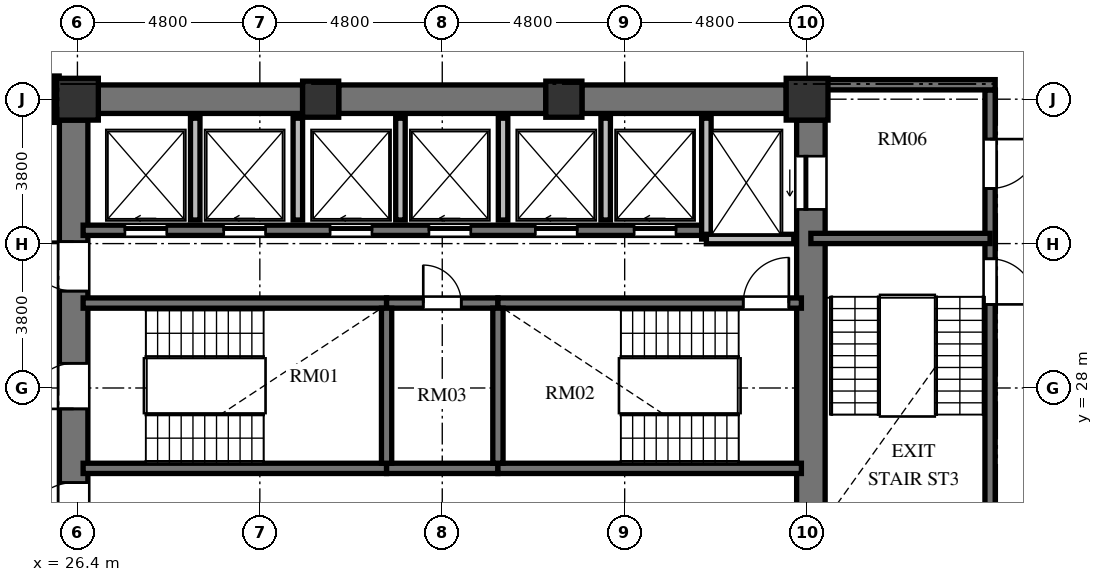
"""IFC4 building model, lengths in metres.
Left out: names, types, materials, properties, quantities, classifications, styles, units other than length and angle.
Written with IfcOpenShell. Run it as: python <this file> out.ifc"""

import sys

from ifc_helpers import new_model, si_unit, direction, frame, frame_2d, origin, origin_2d, place, context, subcontext, project, spatial, rectangle, extrude, element, fill, save


model = new_model("IFC4")
c1 = context("Model", 3, precision=1e-05, world=origin(), true_north=direction((0.0, 1.0)))
c2 = subcontext(c1, "Body", "Model", "MODEL_VIEW")
j1 = project(units=[si_unit("LENGTHUNIT", "METRE"), si_unit("PLANEANGLEUNIT", "RADIAN")], contexts=[c1])
p1 = place(None, origin())
s1 = spatial("IfcSite", under=j1, at=p1, CompositionType="ELEMENT")
p2 = place(p1, origin())
s2 = spatial("IfcBuilding", under=s1, at=p2, CompositionType="ELEMENT")
p3 = place(p2, frame((0.0, 0.0, 121.872)))
s3 = spatial("IfcBuildingStorey", under=s2, at=p3, CompositionType="ELEMENT", Elevation=121.872)
p4 = place(p3, frame((45.6, 35.6, 0.0), z_axis=(0.0, 0.0, 1.0), x_axis=(1.0, 0.0, 0.0)))
e1 = element("IfcColumn", 1, at=p4, inside=s3, PredefinedType="COLUMN", context=c2, shape_type="SweptSolid", body=[
    extrude(rectangle(XDim=1.1, YDim=1.1, at=origin_2d()), origin(), (0.0, 0.0, 1.0), 3.648),
])
for number, where, z_axis, x_axis in (
    (2, (39.2, 35.6, 0.0), (0.0, 0.0, 1.0), (1.0, 0.0, 0.0)),
    (3, (32.8, 35.6, 0.0), (0.0, 0.0, 1.0), (1.0, 0.0, 0.0)),
):
    element("IfcColumn", number, at=place(p3, frame(where, z_axis=z_axis, x_axis=x_axis)), inside=s3, PredefinedType="COLUMN", context=c2, shape_type="SweptSolid", body=[
        extrude(rectangle(XDim=0.95, YDim=0.95, at=origin_2d()), origin(), (0.0, 0.0, 1.0), 3.648),
    ])
p5 = place(p3, frame((26.4, 35.6, 0.0), z_axis=(0.0, 0.0, 1.0), x_axis=(1.0, 0.0, 0.0)))
e4 = element("IfcColumn", 4, at=p5, inside=s3, PredefinedType="COLUMN", context=c2, shape_type="SweptSolid", body=[
    extrude(rectangle(XDim=1.1, YDim=1.1, at=origin_2d()), origin(), (0.0, 0.0, 1.0), 3.648),
])
p6 = place(p3, frame((26.3, 20.95, 0.0), z_axis=(0.0, 0.0, 1.0), x_axis=(0.0, 1.0, 0.0)))
e5 = element("IfcWall", 5, at=p6, inside=s3, PredefinedType="SHEAR", context=c2, shape_type="SweptSolid", body=[
    extrude(rectangle(XDim=14.1, YDim=0.75, at=frame_2d((7.05, 0.0))), origin(), (0.0, 0.0, 1.0), 3.648),
])
p7 = place(p6, frame((6.5, 0.0, 0.0)))
e6 = element("IfcOpeningElement", 6, at=p7, cuts=e5, PredefinedType="OPENING", context=c2, shape_type="SweptSolid", body=[
    extrude(rectangle(XDim=1.2, YDim=2.15, at=frame_2d((0.6, 1.075))), frame((0.0, 0.385, 0.0), z_axis=(0.0, -1.0, 0.0), x_axis=(1.0, 0.0, 0.0)), (0.0, 0.0, 1.0), 0.77),
])
p8 = place(p6, frame((9.6, 0.0, 0.0)))
e7 = element("IfcOpeningElement", 7, at=p8, cuts=e5, PredefinedType="OPENING", context=c2, shape_type="SweptSolid", body=[
    extrude(rectangle(XDim=1.3, YDim=2.2, at=frame_2d((0.65, 1.1))), frame((0.0, 0.385, 0.0), z_axis=(0.0, -1.0, 0.0), x_axis=(1.0, 0.0, 0.0)), (0.0, 0.0, 1.0), 0.77),
])
p9 = place(p6, frame((3.26, 0.0, 0.0)))
e8 = element("IfcOpeningElement", 8, at=p9, cuts=e5, PredefinedType="OPENING", context=c2, shape_type="SweptSolid", body=[
    extrude(rectangle(XDim=1.3, YDim=2.2, at=frame_2d((0.65, 1.1))), frame((0.0, 0.385, 0.0), z_axis=(0.0, -1.0, 0.0), x_axis=(1.0, 0.0, 0.0)), (0.0, 0.0, 1.0), 0.77),
])
p10 = place(p3, frame((45.7, 20.95, 0.0), z_axis=(0.0, 0.0, 1.0), x_axis=(0.0, 1.0, 0.0)))
e9 = element("IfcWall", 9, at=p10, inside=s3, PredefinedType="SHEAR", context=c2, shape_type="SweptSolid", body=[
    extrude(rectangle(XDim=14.1, YDim=0.75, at=frame_2d((7.05, 0.0))), origin(), (0.0, 0.0, 1.0), 3.648),
])
p11 = place(p10, frame((11.75, 0.0, 0.0)))
e10 = element("IfcOpeningElement", 10, at=p11, cuts=e9, PredefinedType="OPENING", context=c2, shape_type="SweptSolid", body=[
    extrude(rectangle(XDim=1.4, YDim=2.3, at=frame_2d((0.7, 1.15))), frame((0.0, 0.385, 0.0), z_axis=(0.0, -1.0, 0.0), x_axis=(1.0, 0.0, 0.0)), (0.0, 0.0, 1.0), 0.77),
])
p12 = place(p10, frame((0.95, 0.0, 0.0)))
e11 = element("IfcOpeningElement", 11, at=p12, cuts=e9, PredefinedType="OPENING", context=c2, shape_type="SweptSolid", body=[
    extrude(rectangle(XDim=1.4, YDim=2.3, at=frame_2d((0.7, 1.15))), frame((0.0, 0.385, 0.0), z_axis=(0.0, -1.0, 0.0), x_axis=(1.0, 0.0, 0.0)), (0.0, 0.0, 1.0), 0.77),
])
p13 = place(p3, frame((26.95, 35.6, 0.0), z_axis=(0.0, 0.0, 1.0), x_axis=(1.0, 0.0, 0.0)))
e12 = element("IfcWall", 12, at=p13, inside=s3, PredefinedType="SHEAR", context=c2, shape_type="SweptSolid", body=[
    extrude(rectangle(XDim=5.375, YDim=0.75, at=frame_2d((2.688, 0.0))), origin(), (0.0, 0.0, 1.0), 3.648),
])
p14 = place(p3, frame((33.275, 35.6, 0.0), z_axis=(0.0, 0.0, 1.0), x_axis=(1.0, 0.0, 0.0)))
e13 = element("IfcWall", 13, at=p14, inside=s3, PredefinedType="SHEAR", context=c2, shape_type="SweptSolid", body=[
    extrude(rectangle(XDim=5.45, YDim=0.75, at=frame_2d((2.725, 0.0))), origin(), (0.0, 0.0, 1.0), 3.648),
])
p15 = place(p3, frame((39.675, 35.6, 0.0), z_axis=(0.0, 0.0, 1.0), x_axis=(1.0, 0.0, 0.0)))
e14 = element("IfcWall", 14, at=p15, inside=s3, PredefinedType="SHEAR", context=c2, shape_type="SweptSolid", body=[
    extrude(rectangle(XDim=5.375, YDim=0.75, at=frame_2d((2.688, 0.0))), origin(), (0.0, 0.0, 1.0), 3.648),
])
p16 = place(p3, frame((26.55, 30.235, 0.0), z_axis=(0.0, 0.0, 1.0), x_axis=(1.0, 0.0, 0.0)))
e15 = element("IfcWall", 15, at=p16, inside=s3, PredefinedType="SHEAR", context=c2, shape_type="SweptSolid", body=[
    extrude(rectangle(XDim=7.985, YDim=0.27, at=frame_2d((3.992, 0.0))), origin(), (0.0, 0.0, 1.0), 3.648),
])
p17 = place(p3, frame((34.535, 30.235, 0.0), z_axis=(0.0, 0.0, 1.0), x_axis=(1.0, 0.0, 0.0)))
e16 = element("IfcWall", 16, at=p17, inside=s3, PredefinedType="SHEAR", context=c2, shape_type="SweptSolid", body=[
    extrude(rectangle(XDim=2.93, YDim=0.27, at=frame_2d((1.465, 0.0))), origin(), (0.0, 0.0, 1.0), 3.648),
])
p18 = place(p17, frame((0.965, 0.0, 0.0)))
e17 = element("IfcOpeningElement", 17, at=p18, cuts=e16, PredefinedType="OPENING", context=c2, shape_type="SweptSolid", body=[
    extrude(rectangle(XDim=1.0, YDim=2.1, at=frame_2d((0.5, 1.05))), frame((0.0, 0.145, 0.0), z_axis=(0.0, -1.0, 0.0), x_axis=(1.0, 0.0, 0.0)), (0.0, 0.0, 1.0), 0.29),
])
p19 = place(p3, frame((37.465, 30.235, 0.0), z_axis=(0.0, 0.0, 1.0), x_axis=(1.0, 0.0, 0.0)))
e18 = element("IfcWall", 18, at=p19, inside=s3, PredefinedType="SHEAR", context=c2, shape_type="SweptSolid", body=[
    extrude(rectangle(XDim=7.985, YDim=0.27, at=frame_2d((3.992, 0.0))), origin(), (0.0, 0.0, 1.0), 3.648),
])
p20 = place(p19, frame((6.455, 0.0, 0.0)))
e19 = element("IfcOpeningElement", 19, at=p20, cuts=e18, PredefinedType="OPENING", context=c2, shape_type="SweptSolid", body=[
    extrude(rectangle(XDim=1.2, YDim=2.15, at=frame_2d((0.6, 1.075))), frame((0.0, 0.145, 0.0), z_axis=(0.0, -1.0, 0.0), x_axis=(1.0, 0.0, 0.0)), (0.0, 0.0, 1.0), 0.29),
])
p21 = place(p3, frame((26.55, 25.885, 0.0), z_axis=(0.0, 0.0, 1.0), x_axis=(1.0, 0.0, 0.0)))
e20 = element("IfcWall", 20, at=p21, inside=s3, PredefinedType="SHEAR", context=c2, shape_type="SweptSolid", body=[
    extrude(rectangle(XDim=7.985, YDim=0.27, at=frame_2d((3.992, 0.0))), origin(), (0.0, 0.0, 1.0), 3.648),
])
p22 = place(p3, frame((34.535, 25.885, 0.0), z_axis=(0.0, 0.0, 1.0), x_axis=(1.0, 0.0, 0.0)))
e21 = element("IfcWall", 21, at=p22, inside=s3, PredefinedType="SHEAR", context=c2, shape_type="SweptSolid", body=[
    extrude(rectangle(XDim=2.93, YDim=0.27, at=frame_2d((1.465, 0.0))), origin(), (0.0, 0.0, 1.0), 3.648),
])
p23 = place(p3, frame((37.465, 25.885, 0.0), z_axis=(0.0, 0.0, 1.0), x_axis=(1.0, 0.0, 0.0)))
e22 = element("IfcWall", 22, at=p23, inside=s3, PredefinedType="SHEAR", context=c2, shape_type="SweptSolid", body=[
    extrude(rectangle(XDim=7.985, YDim=0.27, at=frame_2d((3.992, 0.0))), origin(), (0.0, 0.0, 1.0), 3.648),
])
for number, where, z_axis, x_axis in (
    (23, (34.535, 26.02, 0.0), (0.0, 0.0, 1.0), (0.0, 1.0, 0.0)),
    (24, (37.465, 26.02, 0.0), (0.0, 0.0, 1.0), (0.0, 1.0, 0.0)),
):
    element("IfcWall", number, at=place(p3, frame(where, z_axis=z_axis, x_axis=x_axis)), inside=s3, PredefinedType="SHEAR", context=c2, shape_type="SweptSolid", body=[
        extrude(rectangle(XDim=4.08, YDim=0.27, at=frame_2d((2.04, 0.0))), origin(), (0.0, 0.0, 1.0), 3.648),
    ])
p24 = place(p3, frame((26.55, 32.15, 0.0), z_axis=(0.0, 0.0, 1.0), x_axis=(1.0, 0.0, 0.0)))
e25 = element("IfcWall", 25, at=p24, inside=s3, PredefinedType="SHEAR", context=c2, shape_type="SweptSolid", body=[
    extrude(rectangle(XDim=16.4, YDim=0.27, at=frame_2d((8.2, 0.0))), origin(), (0.0, 0.0, 1.0), 3.648),
])
p25 = place(p24, frame((1.1, 0.0, 0.0)))
e26 = element("IfcOpeningElement", 26, at=p25, cuts=e25, PredefinedType="OPENING", context=c2, shape_type="SweptSolid", body=[
    extrude(rectangle(XDim=1.1, YDim=2.2, at=frame_2d((0.55, 1.1))), frame((0.0, 0.145, 0.0), z_axis=(0.0, -1.0, 0.0), x_axis=(1.0, 0.0, 0.0)), (0.0, 0.0, 1.0), 0.29),
])
p26 = place(p24, frame((3.7, 0.0, 0.0)))
e27 = element("IfcOpeningElement", 27, at=p26, cuts=e25, PredefinedType="OPENING", context=c2, shape_type="SweptSolid", body=[
    extrude(rectangle(XDim=1.1, YDim=2.2, at=frame_2d((0.55, 1.1))), frame((0.0, 0.145, 0.0), z_axis=(0.0, -1.0, 0.0), x_axis=(1.0, 0.0, 0.0)), (0.0, 0.0, 1.0), 0.29),
])
p27 = place(p24, frame((6.5, 0.0, 0.0)))
e28 = element("IfcOpeningElement", 28, at=p27, cuts=e25, PredefinedType="OPENING", context=c2, shape_type="SweptSolid", body=[
    extrude(rectangle(XDim=1.1, YDim=2.2, at=frame_2d((0.55, 1.1))), frame((0.0, 0.145, 0.0), z_axis=(0.0, -1.0, 0.0), x_axis=(1.0, 0.0, 0.0)), (0.0, 0.0, 1.0), 0.29),
])
p28 = place(p24, frame((9.1, 0.0, 0.0)))
e29 = element("IfcOpeningElement", 29, at=p28, cuts=e25, PredefinedType="OPENING", context=c2, shape_type="SweptSolid", body=[
    extrude(rectangle(XDim=1.1, YDim=2.2, at=frame_2d((0.55, 1.1))), frame((0.0, 0.145, 0.0), z_axis=(0.0, -1.0, 0.0), x_axis=(1.0, 0.0, 0.0)), (0.0, 0.0, 1.0), 0.29),
])
p29 = place(p24, frame((11.9, 0.0, 0.0)))
e30 = element("IfcOpeningElement", 30, at=p29, cuts=e25, PredefinedType="OPENING", context=c2, shape_type="SweptSolid", body=[
    extrude(rectangle(XDim=1.1, YDim=2.2, at=frame_2d((0.55, 1.1))), frame((0.0, 0.145, 0.0), z_axis=(0.0, -1.0, 0.0), x_axis=(1.0, 0.0, 0.0)), (0.0, 0.0, 1.0), 0.29),
])
p30 = place(p24, frame((14.5, 0.0, 0.0)))
e31 = element("IfcOpeningElement", 31, at=p30, cuts=e25, PredefinedType="OPENING", context=c2, shape_type="SweptSolid", body=[
    extrude(rectangle(XDim=1.1, YDim=2.2, at=frame_2d((0.55, 1.1))), frame((0.0, 0.145, 0.0), z_axis=(0.0, -1.0, 0.0), x_axis=(1.0, 0.0, 0.0)), (0.0, 0.0, 1.0), 0.29),
])
p31 = place(p3, frame((42.95, 31.92, 0.0), z_axis=(0.0, 0.0, 1.0), x_axis=(0.0, 1.0, 0.0)))
e32 = element("IfcWall", 32, at=p31, inside=s3, PredefinedType="SOLIDWALL", context=c2, shape_type="SweptSolid", body=[
    extrude(rectangle(XDim=3.18, YDim=0.25, at=frame_2d((1.59, 0.0))), origin(), (0.0, 0.0, 1.0), 3.428),
])
p32 = place(p3, frame((42.95, 31.92, 0.0), z_axis=(0.0, 0.0, 1.0), x_axis=(1.0, 0.0, 0.0)))
e33 = element("IfcWall", 33, at=p32, inside=s3, PredefinedType="SOLIDWALL", context=c2, shape_type="SweptSolid", body=[
    extrude(rectangle(XDim=2.3, YDim=0.25, at=frame_2d((1.15, 0.0))), origin(), (0.0, 0.0, 1.0), 3.428),
])
for number, where, z_axis, x_axis in (
    (34, (29.5, 32.42, 0.0), (0.0, 0.0, 1.0), (0.0, 1.0, 0.0)),
    (35, (32.2, 32.42, 0.0), (0.0, 0.0, 1.0), (0.0, 1.0, 0.0)),
    (36, (34.9, 32.42, 0.0), (0.0, 0.0, 1.0), (0.0, 1.0, 0.0)),
    (37, (37.6, 32.42, 0.0), (0.0, 0.0, 1.0), (0.0, 1.0, 0.0)),
    (38, (40.3, 32.42, 0.0), (0.0, 0.0, 1.0), (0.0, 1.0, 0.0)),
):
    element("IfcWall", number, at=place(p3, frame(where, z_axis=z_axis, x_axis=x_axis)), inside=s3, PredefinedType="SOLIDWALL", context=c2, shape_type="SweptSolid", body=[
        extrude(rectangle(XDim=2.68, YDim=0.25, at=frame_2d((1.34, 0.0))), origin(), (0.0, 0.0, 1.0), 3.428),
    ])
p33 = place(p3, frame((50.415, 35.845, 0.0), z_axis=(0.0, 0.0, 1.0), x_axis=(0.0, -1.0, 0.0)))
e39 = element("IfcWall", 39, at=p33, inside=s3, PredefinedType="SHEAR", context=c2, shape_type="SweptSolid", body=[
    extrude(rectangle(XDim=15.825, YDim=0.27, at=frame_2d((7.913, 0.0))), origin(), (0.0, 0.0, 1.0), 3.648),
])
p34 = place(p33, frame((4.445, 0.0, 0.0)))
e40 = element("IfcOpeningElement", 40, at=p34, cuts=e39, PredefinedType="OPENING", context=c2, shape_type="SweptSolid", body=[
    extrude(rectangle(XDim=1.2, YDim=2.15, at=frame_2d((0.6, 1.075))), frame((0.0, 0.145, 0.0), z_axis=(0.0, -1.0, 0.0), x_axis=(1.0, 0.0, 0.0)), (0.0, 0.0, 1.0), 0.29),
])
p35 = place(p33, frame((1.295, 0.0, 0.0)))
e41 = element("IfcOpeningElement", 41, at=p35, cuts=e39, PredefinedType="OPENING", context=c2, shape_type="SweptSolid", body=[
    extrude(rectangle(XDim=1.3, YDim=2.2, at=frame_2d((0.65, 1.1))), frame((0.0, 0.145, 0.0), z_axis=(0.0, -1.0, 0.0), x_axis=(1.0, 0.0, 0.0)), (0.0, 0.0, 1.0), 0.29),
])
p36 = place(p33, frame((13.095, 0.0, 0.0)))
e42 = element("IfcOpeningElement", 42, at=p36, cuts=e39, PredefinedType="OPENING", context=c2, shape_type="SweptSolid", body=[
    extrude(rectangle(XDim=1.3, YDim=2.2, at=frame_2d((0.65, 1.1))), frame((0.0, 0.145, 0.0), z_axis=(0.0, -1.0, 0.0), x_axis=(1.0, 0.0, 0.0)), (0.0, 0.0, 1.0), 0.29),
])
p37 = place(p3, frame((46.075, 35.98, 0.0), z_axis=(0.0, 0.0, 1.0), x_axis=(1.0, 0.0, 0.0)))
e43 = element("IfcWall", 43, at=p37, inside=s3, PredefinedType="SHEAR", context=c2, shape_type="SweptSolid", body=[
    extrude(rectangle(XDim=4.475, YDim=0.27, at=frame_2d((2.238, 0.0))), origin(), (0.0, 0.0, 1.0), 3.648),
])
p38 = place(p3, frame((45.7, 31.935, 0.0), z_axis=(0.0, 0.0, 1.0), x_axis=(1.0, 0.0, 0.0)))
e44 = element("IfcWall", 44, at=p38, inside=s3, PredefinedType="SHEAR", context=c2, shape_type="SweptSolid", body=[
    extrude(rectangle(XDim=4.715, YDim=0.27, at=frame_2d((2.357, 0.0))), origin(), (0.0, 0.0, 1.0), 3.648),
])
p39 = place(p3, frame((25.83, 36.21, 0.0), z_axis=(0.0, 0.0, 1.0), x_axis=(0.0, -1.0, 0.0)))
e45 = element("IfcWall", 45, at=p39, inside=s3, PredefinedType="PARTITIONING", context=c2, shape_type="SweptSolid", body=[
    extrude(rectangle(XDim=1.22, YDim=0.18, at=frame_2d((0.61, 0.0))), origin(), (0.0, 0.0, 1.0), 3.428),
])
p40 = place(p7, origin())
e46 = element("IfcDoor", 46, at=p40, inside=s3, OperationType="SINGLE_SWING_LEFT", PredefinedType="DOOR", context=c2, shape_type="SweptSolid", body=[
    extrude(rectangle(XDim=1.2, YDim=2.15, at=frame_2d((0.6, 1.075))), frame((0.0, 0.025, 0.0), z_axis=(0.0, -1.0, 0.0), x_axis=(1.0, 0.0, 0.0)), (0.0, 0.0, 1.0), 0.05),
])
fill(e6, e46)
p41 = place(p20, origin())
e47 = element("IfcDoor", 47, at=p41, inside=s3, OperationType="SINGLE_SWING_RIGHT", PredefinedType="DOOR", context=c2, shape_type="SweptSolid", body=[
    extrude(rectangle(XDim=1.2, YDim=2.15, at=frame_2d((0.6, 1.075))), frame((0.0, 0.025, 0.0), z_axis=(0.0, -1.0, 0.0), x_axis=(1.0, 0.0, 0.0)), (0.0, 0.0, 1.0), 0.05),
])
fill(e19, e47)
p42 = place(p18, origin())
e48 = element("IfcDoor", 48, at=p42, inside=s3, OperationType="SINGLE_SWING_LEFT", PredefinedType="DOOR", context=c2, shape_type="SweptSolid", body=[
    extrude(rectangle(XDim=1.0, YDim=2.1, at=frame_2d((0.5, 1.05))), frame((0.0, 0.025, 0.0), z_axis=(0.0, -1.0, 0.0), x_axis=(1.0, 0.0, 0.0)), (0.0, 0.0, 1.0), 0.05),
])
fill(e17, e48)
p43 = place(p8, origin())
e49 = element("IfcDoor", 49, at=p43, inside=s3, OperationType="SINGLE_SWING_RIGHT", PredefinedType="DOOR", context=c2, shape_type="SweptSolid", body=[
    extrude(rectangle(XDim=1.3, YDim=2.2, at=frame_2d((0.65, 1.1))), frame((0.0, 0.025, 0.0), z_axis=(0.0, -1.0, 0.0), x_axis=(1.0, 0.0, 0.0)), (0.0, 0.0, 1.0), 0.05),
])
fill(e7, e49)
p44 = place(p9, origin())
e50 = element("IfcDoor", 50, at=p44, inside=s3, OperationType="SINGLE_SWING_LEFT", PredefinedType="DOOR", context=c2, shape_type="SweptSolid", body=[
    extrude(rectangle(XDim=1.3, YDim=2.2, at=frame_2d((0.65, 1.1))), frame((0.0, 0.025, 0.0), z_axis=(0.0, -1.0, 0.0), x_axis=(1.0, 0.0, 0.0)), (0.0, 0.0, 1.0), 0.05),
])
fill(e8, e50)
p45 = place(p25, origin())
e51 = element("IfcDoor", 51, at=p45, inside=s3, OperationType="SLIDING_TO_LEFT", PredefinedType="DOOR", context=c2, shape_type="SweptSolid", body=[
    extrude(rectangle(XDim=1.1, YDim=2.2, at=frame_2d((0.55, 1.1))), frame((0.0, 0.025, 0.0), z_axis=(0.0, -1.0, 0.0), x_axis=(1.0, 0.0, 0.0)), (0.0, 0.0, 1.0), 0.05),
])
fill(e26, e51)
p46 = place(p26, origin())
e52 = element("IfcDoor", 52, at=p46, inside=s3, OperationType="SLIDING_TO_LEFT", PredefinedType="DOOR", context=c2, shape_type="SweptSolid", body=[
    extrude(rectangle(XDim=1.1, YDim=2.2, at=frame_2d((0.55, 1.1))), frame((0.0, 0.025, 0.0), z_axis=(0.0, -1.0, 0.0), x_axis=(1.0, 0.0, 0.0)), (0.0, 0.0, 1.0), 0.05),
])
fill(e27, e52)
p47 = place(p27, origin())
e53 = element("IfcDoor", 53, at=p47, inside=s3, OperationType="SLIDING_TO_LEFT", PredefinedType="DOOR", context=c2, shape_type="SweptSolid", body=[
    extrude(rectangle(XDim=1.1, YDim=2.2, at=frame_2d((0.55, 1.1))), frame((0.0, 0.025, 0.0), z_axis=(0.0, -1.0, 0.0), x_axis=(1.0, 0.0, 0.0)), (0.0, 0.0, 1.0), 0.05),
])
fill(e28, e53)
p48 = place(p28, origin())
e54 = element("IfcDoor", 54, at=p48, inside=s3, OperationType="SLIDING_TO_LEFT", PredefinedType="DOOR", context=c2, shape_type="SweptSolid", body=[
    extrude(rectangle(XDim=1.1, YDim=2.2, at=frame_2d((0.55, 1.1))), frame((0.0, 0.025, 0.0), z_axis=(0.0, -1.0, 0.0), x_axis=(1.0, 0.0, 0.0)), (0.0, 0.0, 1.0), 0.05),
])
fill(e29, e54)
p49 = place(p29, origin())
e55 = element("IfcDoor", 55, at=p49, inside=s3, OperationType="SLIDING_TO_LEFT", PredefinedType="DOOR", context=c2, shape_type="SweptSolid", body=[
    extrude(rectangle(XDim=1.1, YDim=2.2, at=frame_2d((0.55, 1.1))), frame((0.0, 0.025, 0.0), z_axis=(0.0, -1.0, 0.0), x_axis=(1.0, 0.0, 0.0)), (0.0, 0.0, 1.0), 0.05),
])
fill(e30, e55)
p50 = place(p30, origin())
e56 = element("IfcDoor", 56, at=p50, inside=s3, OperationType="SLIDING_TO_LEFT", PredefinedType="DOOR", context=c2, shape_type="SweptSolid", body=[
    extrude(rectangle(XDim=1.1, YDim=2.2, at=frame_2d((0.55, 1.1))), frame((0.0, 0.025, 0.0), z_axis=(0.0, -1.0, 0.0), x_axis=(1.0, 0.0, 0.0)), (0.0, 0.0, 1.0), 0.05),
])
fill(e31, e56)
p51 = place(p11, origin())
e57 = element("IfcDoor", 57, at=p51, inside=s3, OperationType="SLIDING_TO_LEFT", PredefinedType="DOOR", context=c2, shape_type="SweptSolid", body=[
    extrude(rectangle(XDim=1.4, YDim=2.3, at=frame_2d((0.7, 1.15))), frame((0.0, 0.025, 0.0), z_axis=(0.0, -1.0, 0.0), x_axis=(1.0, 0.0, 0.0)), (0.0, 0.0, 1.0), 0.05),
])
fill(e10, e57)
p52 = place(p34, origin())
e58 = element("IfcDoor", 58, at=p52, inside=s3, OperationType="SINGLE_SWING_RIGHT", PredefinedType="DOOR", context=c2, shape_type="SweptSolid", body=[
    extrude(rectangle(XDim=1.2, YDim=2.15, at=frame_2d((0.6, 1.075))), frame((0.0, 0.025, 0.0), z_axis=(0.0, -1.0, 0.0), x_axis=(1.0, 0.0, 0.0)), (0.0, 0.0, 1.0), 0.05),
])
fill(e40, e58)
p53 = place(p35, origin())
e59 = element("IfcDoor", 59, at=p53, inside=s3, OperationType="SINGLE_SWING_LEFT", PredefinedType="DOOR", context=c2, shape_type="SweptSolid", body=[
    extrude(rectangle(XDim=1.3, YDim=2.2, at=frame_2d((0.65, 1.1))), frame((0.0, 0.025, 0.0), z_axis=(0.0, -1.0, 0.0), x_axis=(1.0, 0.0, 0.0)), (0.0, 0.0, 1.0), 0.05),
])
fill(e41, e59)
save(model, sys.argv[1])
